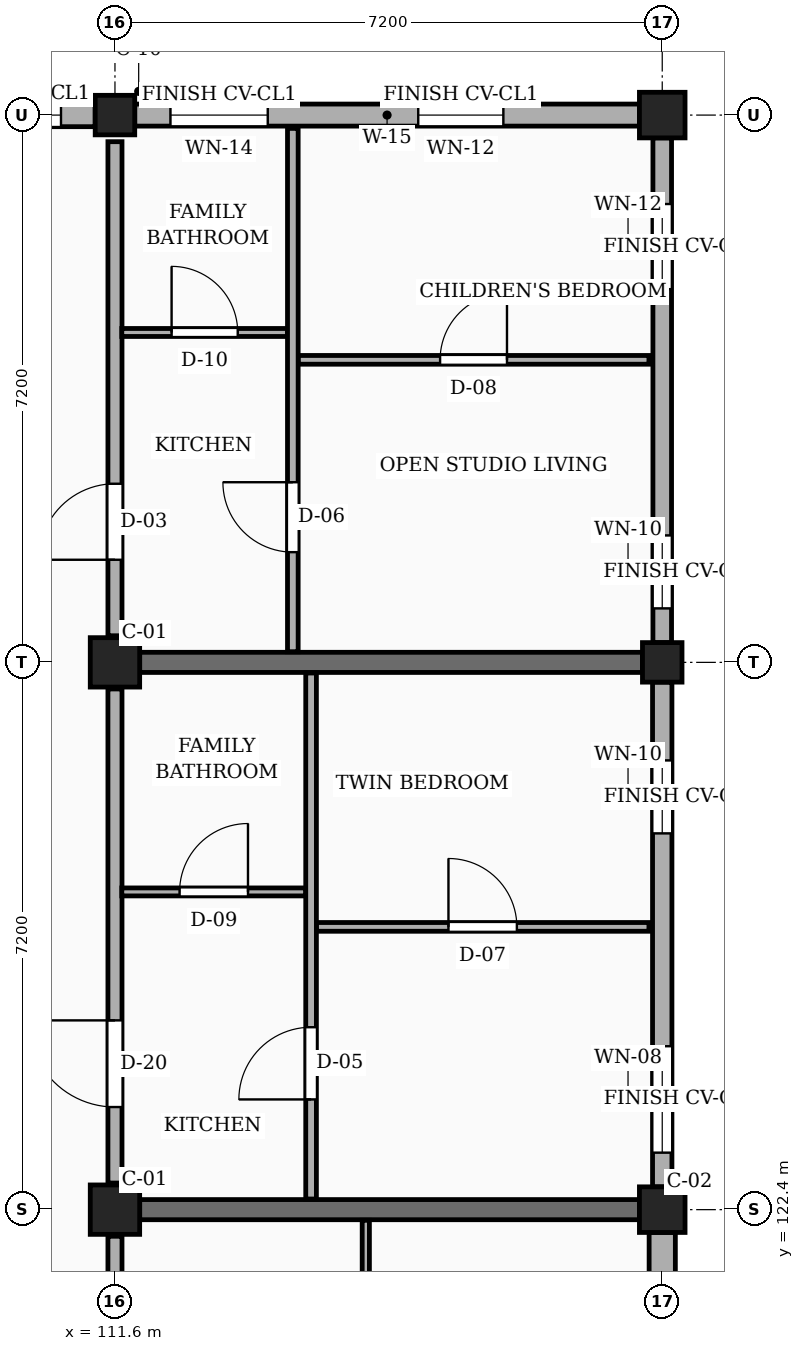
"""IFC4 building model, lengths in metres.
Left out: names, types, materials, properties, quantities, classifications, styles, units other than length and angle.
Written with IfcOpenShell. Run it as: python <this file> out.ifc"""

import sys

from ifc_helpers import new_model, si_unit, direction, frame, frame_2d, origin, origin_2d, place, context, subcontext, project, spatial, rectangle, circle, extrude, element, fill, save


model = new_model("IFC4")
c1 = context("Model", 3, precision=1e-05, world=origin(), true_north=direction((0.0, 1.0)))
c2 = subcontext(c1, "Body", "Model", "MODEL_VIEW")
j1 = project(units=[si_unit("LENGTHUNIT", "METRE"), si_unit("PLANEANGLEUNIT", "RADIAN")], contexts=[c1])
p1 = place(None, origin())
s1 = spatial("IfcSite", under=j1, at=p1, CompositionType="ELEMENT")
p2 = place(p1, origin())
s2 = spatial("IfcBuilding", under=s1, at=p2, CompositionType="ELEMENT")
p3 = place(p2, origin())
s3 = spatial("IfcBuildingStorey", under=s2, at=p3, CompositionType="ELEMENT", Elevation=0.0)
for number, where, z_axis, x_axis in (
    (1, (111.6, 122.4, 0.0), (0.0, 0.0, 1.0), (1.0, 0.0, 0.0)),
    (2, (111.6, 129.6, 0.0), (0.0, 0.0, 1.0), (1.0, 0.0, 0.0)),
):
    element("IfcColumn", number, at=place(p3, frame(where, z_axis=z_axis, x_axis=x_axis)), inside=s3, PredefinedType="COLUMN", context=c2, shape_type="SweptSolid", body=[
        extrude(rectangle(XDim=0.65, YDim=0.65, at=origin_2d()), origin(), (0.0, 0.0, 1.0), 4.5),
    ])
p4 = place(p3, frame((111.6, 136.8, 0.0), z_axis=(0.0, 0.0, 1.0), x_axis=(1.0, 0.0, 0.0)))
e3 = element("IfcColumn", 3, at=p4, inside=s3, PredefinedType="COLUMN", context=c2, shape_type="SweptSolid", body=[
    extrude(circle(Radius=0.26, at=origin_2d()), origin(), (0.0, 0.0, 1.0), 4.5),
])
p5 = place(p3, frame((118.8, 122.4, 0.0), z_axis=(0.0, 0.0, 1.0), x_axis=(1.0, 0.0, 0.0)))
e4 = element("IfcColumn", 4, at=p5, inside=s3, PredefinedType="COLUMN", context=c2, shape_type="SweptSolid", body=[
    extrude(rectangle(XDim=0.6, YDim=0.6, at=origin_2d()), origin(), (0.0, 0.0, 1.0), 4.5),
])
p6 = place(p3, frame((118.8, 129.6, 0.0), z_axis=(0.0, 0.0, 1.0), x_axis=(1.0, 0.0, 0.0)))
e5 = element("IfcColumn", 5, at=p6, inside=s3, PredefinedType="COLUMN", context=c2, shape_type="SweptSolid", body=[
    extrude(circle(Radius=0.26, at=origin_2d()), origin(), (0.0, 0.0, 1.0), 4.5),
])
p7 = place(p3, frame((118.8, 136.8, 0.0), z_axis=(0.0, 0.0, 1.0), x_axis=(1.0, 0.0, 0.0)))
e6 = element("IfcColumn", 6, at=p7, inside=s3, PredefinedType="COLUMN", context=c2, shape_type="SweptSolid", body=[
    extrude(rectangle(XDim=0.6, YDim=0.6, at=origin_2d()), origin(), (0.0, 0.0, 1.0), 4.5),
])
p8 = place(p3, frame((111.925, 122.4, 0.0), z_axis=(0.0, 0.0, 1.0), x_axis=(1.0, 0.0, 0.0)))
e7 = element("IfcWall", 7, at=p8, inside=s3, PredefinedType="SOLIDWALL", context=c2, shape_type="SweptSolid", body=[
    extrude(rectangle(XDim=6.575, YDim=0.265, at=frame_2d((3.288, 0.0))), origin(), (0.0, 0.0, 1.0), 3.54),
])
p9 = place(p3, frame((111.925, 129.6, 0.0), z_axis=(0.0, 0.0, 1.0), x_axis=(1.0, 0.0, 0.0)))
e8 = element("IfcWall", 8, at=p9, inside=s3, PredefinedType="SOLIDWALL", context=c2, shape_type="SweptSolid", body=[
    extrude(rectangle(XDim=6.615, YDim=0.265, at=frame_2d((3.308, 0.0))), origin(), (0.0, 0.0, 1.0), 3.54),
])
p10 = place(p3, frame((118.8, 115.5, 0.0), z_axis=(0.0, 0.0, 1.0), x_axis=(0.0, 1.0, 0.0)))
e9 = element("IfcWall", 9, at=p10, inside=s3, PredefinedType="SOLIDWALL", context=c2, shape_type="SweptSolid", body=[
    extrude(rectangle(XDim=6.6, YDim=0.345, at=frame_2d((3.3, 0.0))), origin(), (0.0, 0.0, 1.0), 3.81),
])
p11 = place(p10, frame((0.45, 0.0, 0.78)))
e10 = element("IfcOpeningElement", 10, at=p11, cuts=e9, PredefinedType="OPENING", context=c2, shape_type="SweptSolid", body=[
    extrude(rectangle(XDim=1.24, YDim=1.15, at=frame_2d((0.62, 0.575))), frame((0.0, 0.183, 0.0), z_axis=(0.0, -1.0, 0.0), x_axis=(1.0, 0.0, 0.0)), (0.0, 0.0, 1.0), 0.365),
])
p12 = place(p10, frame((4.65, 0.0, 0.78)))
e11 = element("IfcOpeningElement", 11, at=p12, cuts=e9, PredefinedType="OPENING", context=c2, shape_type="SweptSolid", body=[
    extrude(rectangle(XDim=1.4, YDim=1.15, at=frame_2d((0.7, 0.575))), frame((0.0, 0.183, 0.0), z_axis=(0.0, -1.0, 0.0), x_axis=(1.0, 0.0, 0.0)), (0.0, 0.0, 1.0), 0.365),
])
p13 = place(p3, frame((118.8, 122.7, 0.0), z_axis=(0.0, 0.0, 1.0), x_axis=(0.0, 1.0, 0.0)))
e12 = element("IfcWall", 12, at=p13, inside=s3, PredefinedType="SOLIDWALL", context=c2, shape_type="SweptSolid", body=[
    extrude(rectangle(XDim=6.64, YDim=0.255, at=frame_2d((3.32, 0.0))), origin(), (0.0, 0.0, 1.0), 3.81),
])
p14 = place(p13, frame((0.45, 0.0, 0.78)))
e13 = element("IfcOpeningElement", 13, at=p14, cuts=e12, PredefinedType="OPENING", context=c2, shape_type="SweptSolid", body=[
    extrude(rectangle(XDim=1.4, YDim=1.15, at=frame_2d((0.7, 0.575))), frame((0.0, 0.137, 0.0), z_axis=(0.0, -1.0, 0.0), x_axis=(1.0, 0.0, 0.0)), (0.0, 0.0, 1.0), 0.275),
])
p15 = place(p13, frame((4.65, 0.0, 0.78)))
e14 = element("IfcOpeningElement", 14, at=p15, cuts=e12, PredefinedType="OPENING", context=c2, shape_type="SweptSolid", body=[
    extrude(rectangle(XDim=0.96, YDim=1.26, at=frame_2d((0.48, 0.63))), frame((0.0, 0.137, 0.0), z_axis=(0.0, -1.0, 0.0), x_axis=(1.0, 0.0, 0.0)), (0.0, 0.0, 1.0), 0.275),
])
p16 = place(p3, frame((118.8, 129.86, 0.0), z_axis=(0.0, 0.0, 1.0), x_axis=(0.0, 1.0, 0.0)))
e15 = element("IfcWall", 15, at=p16, inside=s3, PredefinedType="SOLIDWALL", context=c2, shape_type="SweptSolid", body=[
    extrude(rectangle(XDim=6.64, YDim=0.245, at=frame_2d((3.32, 0.0))), origin(), (0.0, 0.0, 1.0), 3.81),
])
p17 = place(p16, frame((0.45, 0.0, 0.78)))
e16 = element("IfcOpeningElement", 16, at=p17, cuts=e15, PredefinedType="OPENING", context=c2, shape_type="SweptSolid", body=[
    extrude(rectangle(XDim=0.96, YDim=1.26, at=frame_2d((0.48, 0.63))), frame((0.0, 0.133, 0.0), z_axis=(0.0, -1.0, 0.0), x_axis=(1.0, 0.0, 0.0)), (0.0, 0.0, 1.0), 0.265),
])
p18 = place(p16, frame((4.65, 0.0, 0.78)))
e17 = element("IfcOpeningElement", 17, at=p18, cuts=e15, PredefinedType="OPENING", context=c2, shape_type="SweptSolid", body=[
    extrude(rectangle(XDim=1.12, YDim=1.26, at=frame_2d((0.56, 0.63))), frame((0.0, 0.133, 0.0), z_axis=(0.0, -1.0, 0.0), x_axis=(1.0, 0.0, 0.0)), (0.0, 0.0, 1.0), 0.265),
])
p19 = place(p3, frame((118.5, 136.8, 0.0), z_axis=(0.0, 0.0, 1.0), x_axis=(-1.0, 0.0, 0.0)))
e18 = element("IfcWall", 18, at=p19, inside=s3, PredefinedType="SOLIDWALL", context=c2, shape_type="SweptSolid", body=[
    extrude(rectangle(XDim=6.64, YDim=0.29, at=frame_2d((3.32, 0.0))), origin(), (0.0, 0.0, 1.0), 3.81),
])
p20 = place(p19, frame((1.79, 0.0, 0.78)))
e19 = element("IfcOpeningElement", 19, at=p20, cuts=e18, PredefinedType="OPENING", context=c2, shape_type="SweptSolid", body=[
    extrude(rectangle(XDim=1.12, YDim=1.26, at=frame_2d((0.56, 0.63))), frame((0.0, 0.155, 0.0), z_axis=(0.0, -1.0, 0.0), x_axis=(1.0, 0.0, 0.0)), (0.0, 0.0, 1.0), 0.31),
])
p21 = place(p19, frame((4.89, 0.0, 0.78)))
e20 = element("IfcOpeningElement", 20, at=p21, cuts=e18, PredefinedType="OPENING", context=c2, shape_type="SweptSolid", body=[
    extrude(rectangle(XDim=1.28, YDim=1.26, at=frame_2d((0.64, 0.63))), frame((0.0, 0.155, 0.0), z_axis=(0.0, -1.0, 0.0), x_axis=(1.0, 0.0, 0.0)), (0.0, 0.0, 1.0), 0.31),
])
p22 = place(p3, frame((111.34, 136.8, 0.0), z_axis=(0.0, 0.0, 1.0), x_axis=(-1.0, 0.0, 0.0)))
e21 = element("IfcWall", 21, at=p22, inside=s3, PredefinedType="SOLIDWALL", context=c2, shape_type="SweptSolid", body=[
    extrude(rectangle(XDim=6.64, YDim=0.305, at=frame_2d((3.32, 0.0))), origin(), (0.0, 0.0, 1.0), 3.81),
])
p23 = place(p22, frame((0.45, 0.0, 0.78)))
e22 = element("IfcOpeningElement", 22, at=p23, cuts=e21, PredefinedType="OPENING", context=c2, shape_type="SweptSolid", body=[
    extrude(rectangle(XDim=1.28, YDim=1.26, at=frame_2d((0.64, 0.63))), frame((0.0, 0.163, 0.0), z_axis=(0.0, -1.0, 0.0), x_axis=(1.0, 0.0, 0.0)), (0.0, 0.0, 1.0), 0.325),
])
p24 = place(p22, frame((4.65, 0.0, 0.78)))
e23 = element("IfcOpeningElement", 23, at=p24, cuts=e21, PredefinedType="OPENING", context=c2, shape_type="SweptSolid", body=[
    extrude(rectangle(XDim=1.44, YDim=1.26, at=frame_2d((0.72, 0.63))), frame((0.0, 0.163, 0.0), z_axis=(0.0, -1.0, 0.0), x_axis=(1.0, 0.0, 0.0)), (0.0, 0.0, 1.0), 0.325),
])
p25 = place(p3, frame((111.6, 115.55, 0.0), z_axis=(0.0, 0.0, 1.0), x_axis=(0.0, 1.0, 0.0)))
e24 = element("IfcWall", 24, at=p25, inside=s3, PredefinedType="PARTITIONING", context=c2, shape_type="SweptSolid", body=[
    extrude(rectangle(XDim=6.5, YDim=0.185, at=frame_2d((3.25, 0.0))), origin(), (0.0, 0.0, 1.0), 3.49),
])
p26 = place(p25, frame((1.1, 0.0, 0.0)))
e25 = element("IfcOpeningElement", 25, at=p26, cuts=e24, PredefinedType="OPENING", context=c2, shape_type="SweptSolid", body=[
    extrude(rectangle(XDim=0.94, YDim=2.12, at=frame_2d((0.47, 1.06))), frame((0.0, 0.103, 0.0), z_axis=(0.0, -1.0, 0.0), x_axis=(1.0, 0.0, 0.0)), (0.0, 0.0, 1.0), 0.205),
])
p27 = place(p3, frame((111.6, 122.75, 0.0), z_axis=(0.0, 0.0, 1.0), x_axis=(0.0, 1.0, 0.0)))
e26 = element("IfcWall", 26, at=p27, inside=s3, PredefinedType="PARTITIONING", context=c2, shape_type="SweptSolid", body=[
    extrude(rectangle(XDim=6.5, YDim=0.185, at=frame_2d((3.25, 0.0))), origin(), (0.0, 0.0, 1.0), 3.49),
])
p28 = place(p27, frame((1.0, 0.0, 0.0)))
e27 = element("IfcOpeningElement", 27, at=p28, cuts=e26, PredefinedType="OPENING", context=c2, shape_type="SweptSolid", body=[
    extrude(rectangle(XDim=1.14, YDim=2.18, at=frame_2d((0.57, 1.09))), frame((0.0, 0.103, 0.0), z_axis=(0.0, -1.0, 0.0), x_axis=(1.0, 0.0, 0.0)), (0.0, 0.0, 1.0), 0.205),
])
p29 = place(p3, frame((111.6, 129.95, 0.0), z_axis=(0.0, 0.0, 1.0), x_axis=(0.0, 1.0, 0.0)))
e28 = element("IfcWall", 28, at=p29, inside=s3, PredefinedType="PARTITIONING", context=c2, shape_type="SweptSolid", body=[
    extrude(rectangle(XDim=6.5, YDim=0.185, at=frame_2d((3.25, 0.0))), origin(), (0.0, 0.0, 1.0), 3.49),
])
p30 = place(p29, frame((1.0, 0.0, 0.0)))
e29 = element("IfcOpeningElement", 29, at=p30, cuts=e28, PredefinedType="OPENING", context=c2, shape_type="SweptSolid", body=[
    extrude(rectangle(XDim=1.0, YDim=2.15, at=frame_2d((0.5, 1.075))), frame((0.0, 0.103, 0.0), z_axis=(0.0, -1.0, 0.0), x_axis=(1.0, 0.0, 0.0)), (0.0, 0.0, 1.0), 0.205),
])
p31 = place(p3, frame((114.9, 119.07, 0.0), z_axis=(0.0, 0.0, 1.0), x_axis=(0.0, 1.0, 0.0)))
e30 = element("IfcWall", 30, at=p31, inside=s3, PredefinedType="PARTITIONING", context=c2, shape_type="SweptSolid", body=[
    extrude(rectangle(XDim=3.19, YDim=0.095, at=frame_2d((1.595, 0.0))), origin(), (0.0, 0.0, 1.0), 3.675),
])
p32 = place(p3, frame((114.25, 126.12, 0.0), z_axis=(0.0, 0.0, 1.0), x_axis=(1.0, 0.0, 0.0)))
e31 = element("IfcWall", 31, at=p32, inside=s3, PredefinedType="PARTITIONING", context=c2, shape_type="SweptSolid", body=[
    extrude(rectangle(XDim=4.375, YDim=0.115, at=frame_2d((2.188, 0.0))), origin(), (0.0, 0.0, 1.0), 3.675),
])
p33 = place(p32, frame((1.738, 0.0, 0.0)))
e32 = element("IfcOpeningElement", 32, at=p33, cuts=e31, PredefinedType="OPENING", context=c2, shape_type="SweptSolid", body=[
    extrude(rectangle(XDim=0.9, YDim=2.1, at=frame_2d((0.45, 1.05))), frame((0.0, 0.067, 0.0), z_axis=(0.0, -1.0, 0.0), x_axis=(1.0, 0.0, 0.0)), (0.0, 0.0, 1.0), 0.135),
])
p34 = place(p3, frame((111.69, 126.58, 0.0), z_axis=(0.0, 0.0, 1.0), x_axis=(1.0, 0.0, 0.0)))
e33 = element("IfcWall", 33, at=p34, inside=s3, PredefinedType="PARTITIONING", context=c2, shape_type="SweptSolid", body=[
    extrude(rectangle(XDim=2.42, YDim=0.105, at=frame_2d((1.21, 0.0))), origin(), (0.0, 0.0, 1.0), 3.675),
])
p35 = place(p34, frame((0.76, 0.0, 0.0)))
e34 = element("IfcOpeningElement", 34, at=p35, cuts=e33, PredefinedType="OPENING", context=c2, shape_type="SweptSolid", body=[
    extrude(rectangle(XDim=0.9, YDim=2.05, at=frame_2d((0.45, 1.025))), frame((0.0, 0.062, 0.0), z_axis=(0.0, -1.0, 0.0), x_axis=(1.0, 0.0, 0.0)), (0.0, 0.0, 1.0), 0.125),
])
p36 = place(p3, frame((114.18, 122.54, 0.0), z_axis=(0.0, 0.0, 1.0), x_axis=(0.0, 1.0, 0.0)))
e35 = element("IfcWall", 35, at=p36, inside=s3, PredefinedType="PARTITIONING", context=c2, shape_type="SweptSolid", body=[
    extrude(rectangle(XDim=6.92, YDim=0.14, at=frame_2d((3.46, 0.0))), origin(), (0.0, 0.0, 1.0), 3.675),
])
p37 = place(p36, frame((1.31, 0.0, 0.0)))
e36 = element("IfcOpeningElement", 36, at=p37, cuts=e35, PredefinedType="OPENING", context=c2, shape_type="SweptSolid", body=[
    extrude(rectangle(XDim=0.95, YDim=2.1, at=frame_2d((0.475, 1.05))), frame((0.0, 0.08, 0.0), z_axis=(0.0, -1.0, 0.0), x_axis=(1.0, 0.0, 0.0)), (0.0, 0.0, 1.0), 0.16),
])
p38 = place(p3, frame((114.01, 133.58, 0.0), z_axis=(0.0, 0.0, 1.0), x_axis=(1.0, 0.0, 0.0)))
e37 = element("IfcWall", 37, at=p38, inside=s3, PredefinedType="PARTITIONING", context=c2, shape_type="SweptSolid", body=[
    extrude(rectangle(XDim=4.615, YDim=0.115, at=frame_2d((2.308, 0.0))), origin(), (0.0, 0.0, 1.0), 3.675),
])
p39 = place(p38, frame((1.867, 0.0, 0.0)))
e38 = element("IfcOpeningElement", 38, at=p39, cuts=e37, PredefinedType="OPENING", context=c2, shape_type="SweptSolid", body=[
    extrude(rectangle(XDim=0.88, YDim=2.08, at=frame_2d((0.44, 1.04))), frame((0.0, 0.067, 0.0), z_axis=(0.0, -1.0, 0.0), x_axis=(1.0, 0.0, 0.0)), (0.0, 0.0, 1.0), 0.135),
])
p40 = place(p3, frame((111.69, 133.94, 0.0), z_axis=(0.0, 0.0, 1.0), x_axis=(1.0, 0.0, 0.0)))
e39 = element("IfcWall", 39, at=p40, inside=s3, PredefinedType="PARTITIONING", context=c2, shape_type="SweptSolid", body=[
    extrude(rectangle(XDim=2.18, YDim=0.105, at=frame_2d((1.09, 0.0))), origin(), (0.0, 0.0, 1.0), 3.675),
])
p41 = place(p40, frame((0.655, 0.0, 0.0)))
e40 = element("IfcOpeningElement", 40, at=p41, cuts=e39, PredefinedType="OPENING", context=c2, shape_type="SweptSolid", body=[
    extrude(rectangle(XDim=0.87, YDim=2.05, at=frame_2d((0.435, 1.025))), frame((0.0, 0.062, 0.0), z_axis=(0.0, -1.0, 0.0), x_axis=(1.0, 0.0, 0.0)), (0.0, 0.0, 1.0), 0.125),
])
p42 = place(p3, frame((113.94, 129.74, 0.0), z_axis=(0.0, 0.0, 1.0), x_axis=(0.0, 1.0, 0.0)))
e41 = element("IfcWall", 41, at=p42, inside=s3, PredefinedType="PARTITIONING", context=c2, shape_type="SweptSolid", body=[
    extrude(rectangle(XDim=6.885, YDim=0.14, at=frame_2d((3.442, 0.0))), origin(), (0.0, 0.0, 1.0), 3.675),
])
p43 = place(p42, frame((1.31, 0.0, 0.0)))
e42 = element("IfcOpeningElement", 42, at=p43, cuts=e41, PredefinedType="OPENING", context=c2, shape_type="SweptSolid", body=[
    extrude(rectangle(XDim=0.92, YDim=2.1, at=frame_2d((0.46, 1.05))), frame((0.0, 0.08, 0.0), z_axis=(0.0, -1.0, 0.0), x_axis=(1.0, 0.0, 0.0)), (0.0, 0.0, 1.0), 0.16),
])
p44 = place(p14, origin())
e43 = element("IfcWindow", 43, at=p44, inside=s3, PartitioningType="SINGLE_PANEL", PredefinedType="WINDOW", context=c2, shape_type="SweptSolid", body=[
    extrude(rectangle(XDim=1.4, YDim=1.15, at=frame_2d((0.7, 0.575))), frame((0.0, 0.03, 0.0), z_axis=(0.0, -1.0, 0.0), x_axis=(1.0, 0.0, 0.0)), (0.0, 0.0, 1.0), 0.06),
])
fill(e13, e43)
p45 = place(p15, origin())
e44 = element("IfcWindow", 44, at=p45, inside=s3, PartitioningType="SINGLE_PANEL", PredefinedType="WINDOW", context=c2, shape_type="SweptSolid", body=[
    extrude(rectangle(XDim=0.96, YDim=1.26, at=frame_2d((0.48, 0.63))), frame((0.0, 0.03, 0.0), z_axis=(0.0, -1.0, 0.0), x_axis=(1.0, 0.0, 0.0)), (0.0, 0.0, 1.0), 0.06),
])
fill(e14, e44)
p46 = place(p17, origin())
e45 = element("IfcWindow", 45, at=p46, inside=s3, PartitioningType="SINGLE_PANEL", PredefinedType="WINDOW", context=c2, shape_type="SweptSolid", body=[
    extrude(rectangle(XDim=0.96, YDim=1.26, at=frame_2d((0.48, 0.63))), frame((0.0, 0.03, 0.0), z_axis=(0.0, -1.0, 0.0), x_axis=(1.0, 0.0, 0.0)), (0.0, 0.0, 1.0), 0.06),
])
fill(e16, e45)
p47 = place(p18, origin())
e46 = element("IfcWindow", 46, at=p47, inside=s3, PartitioningType="SINGLE_PANEL", PredefinedType="WINDOW", context=c2, shape_type="SweptSolid", body=[
    extrude(rectangle(XDim=1.12, YDim=1.26, at=frame_2d((0.56, 0.63))), frame((0.0, 0.03, 0.0), z_axis=(0.0, -1.0, 0.0), x_axis=(1.0, 0.0, 0.0)), (0.0, 0.0, 1.0), 0.06),
])
fill(e17, e46)
p48 = place(p20, origin())
e47 = element("IfcWindow", 47, at=p48, inside=s3, PartitioningType="SINGLE_PANEL", PredefinedType="WINDOW", context=c2, shape_type="SweptSolid", body=[
    extrude(rectangle(XDim=1.12, YDim=1.26, at=frame_2d((0.56, 0.63))), frame((0.0, 0.03, 0.0), z_axis=(0.0, -1.0, 0.0), x_axis=(1.0, 0.0, 0.0)), (0.0, 0.0, 1.0), 0.06),
])
fill(e19, e47)
p49 = place(p21, origin())
e48 = element("IfcWindow", 48, at=p49, inside=s3, PartitioningType="SINGLE_PANEL", PredefinedType="WINDOW", context=c2, shape_type="SweptSolid", body=[
    extrude(rectangle(XDim=1.28, YDim=1.26, at=frame_2d((0.64, 0.63))), frame((0.0, 0.03, 0.0), z_axis=(0.0, -1.0, 0.0), x_axis=(1.0, 0.0, 0.0)), (0.0, 0.0, 1.0), 0.06),
])
fill(e20, e48)
p50 = place(p23, origin())
e49 = element("IfcWindow", 49, at=p50, inside=s3, PartitioningType="SINGLE_PANEL", PredefinedType="WINDOW", context=c2, shape_type="SweptSolid", body=[
    extrude(rectangle(XDim=1.28, YDim=1.26, at=frame_2d((0.64, 0.63))), frame((0.0, 0.03, 0.0), z_axis=(0.0, -1.0, 0.0), x_axis=(1.0, 0.0, 0.0)), (0.0, 0.0, 1.0), 0.06),
])
fill(e22, e49)
p51 = place(p28, origin())
e50 = element("IfcDoor", 50, at=p51, inside=s3, OperationType="SINGLE_SWING_RIGHT", PredefinedType="DOOR", context=c2, shape_type="SweptSolid", body=[
    extrude(rectangle(XDim=1.14, YDim=2.18, at=frame_2d((0.57, 1.09))), frame((0.0, 0.025, 0.0), z_axis=(0.0, -1.0, 0.0), x_axis=(1.0, 0.0, 0.0)), (0.0, 0.0, 1.0), 0.05),
])
fill(e27, e50)
p52 = place(p30, origin())
e51 = element("IfcDoor", 51, at=p52, inside=s3, OperationType="SINGLE_SWING_LEFT", PredefinedType="DOOR", context=c2, shape_type="SweptSolid", body=[
    extrude(rectangle(XDim=1.0, YDim=2.15, at=frame_2d((0.5, 1.075))), frame((0.0, 0.025, 0.0), z_axis=(0.0, -1.0, 0.0), x_axis=(1.0, 0.0, 0.0)), (0.0, 0.0, 1.0), 0.05),
])
fill(e29, e51)
p53 = place(p33, origin())
e52 = element("IfcDoor", 52, at=p53, inside=s3, OperationType="SINGLE_SWING_LEFT", PredefinedType="DOOR", context=c2, shape_type="SweptSolid", body=[
    extrude(rectangle(XDim=0.9, YDim=2.1, at=frame_2d((0.45, 1.05))), frame((0.0, 0.025, 0.0), z_axis=(0.0, -1.0, 0.0), x_axis=(1.0, 0.0, 0.0)), (0.0, 0.0, 1.0), 0.05),
])
fill(e32, e52)
p54 = place(p35, origin())
e53 = element("IfcDoor", 53, at=p54, inside=s3, OperationType="SINGLE_SWING_RIGHT", PredefinedType="DOOR", context=c2, shape_type="SweptSolid", body=[
    extrude(rectangle(XDim=0.9, YDim=2.05, at=frame_2d((0.45, 1.025))), frame((0.0, 0.025, 0.0), z_axis=(0.0, -1.0, 0.0), x_axis=(1.0, 0.0, 0.0)), (0.0, 0.0, 1.0), 0.05),
])
fill(e34, e53)
p55 = place(p37, origin())
e54 = element("IfcDoor", 54, at=p55, inside=s3, OperationType="SINGLE_SWING_LEFT", PredefinedType="DOOR", context=c2, shape_type="SweptSolid", body=[
    extrude(rectangle(XDim=0.95, YDim=2.1, at=frame_2d((0.475, 1.05))), frame((0.0, 0.025, 0.0), z_axis=(0.0, -1.0, 0.0), x_axis=(1.0, 0.0, 0.0)), (0.0, 0.0, 1.0), 0.05),
])
fill(e36, e54)
p56 = place(p39, origin())
e55 = element("IfcDoor", 55, at=p56, inside=s3, OperationType="SINGLE_SWING_RIGHT", PredefinedType="DOOR", context=c2, shape_type="SweptSolid", body=[
    extrude(rectangle(XDim=0.88, YDim=2.08, at=frame_2d((0.44, 1.04))), frame((0.0, 0.025, 0.0), z_axis=(0.0, -1.0, 0.0), x_axis=(1.0, 0.0, 0.0)), (0.0, 0.0, 1.0), 0.05),
])
fill(e38, e55)
p57 = place(p41, origin())
e56 = element("IfcDoor", 56, at=p57, inside=s3, OperationType="SINGLE_SWING_LEFT", PredefinedType="DOOR", context=c2, shape_type="SweptSolid", body=[
    extrude(rectangle(XDim=0.87, YDim=2.05, at=frame_2d((0.435, 1.025))), frame((0.0, 0.025, 0.0), z_axis=(0.0, -1.0, 0.0), x_axis=(1.0, 0.0, 0.0)), (0.0, 0.0, 1.0), 0.05),
])
fill(e40, e56)
p58 = place(p43, origin())
e57 = element("IfcDoor", 57, at=p58, inside=s3, OperationType="SINGLE_SWING_RIGHT", PredefinedType="DOOR", context=c2, shape_type="SweptSolid", body=[
    extrude(rectangle(XDim=0.92, YDim=2.1, at=frame_2d((0.46, 1.05))), frame((0.0, 0.025, 0.0), z_axis=(0.0, -1.0, 0.0), x_axis=(1.0, 0.0, 0.0)), (0.0, 0.0, 1.0), 0.05),
])
fill(e42, e57)
save(model, sys.argv[1])
